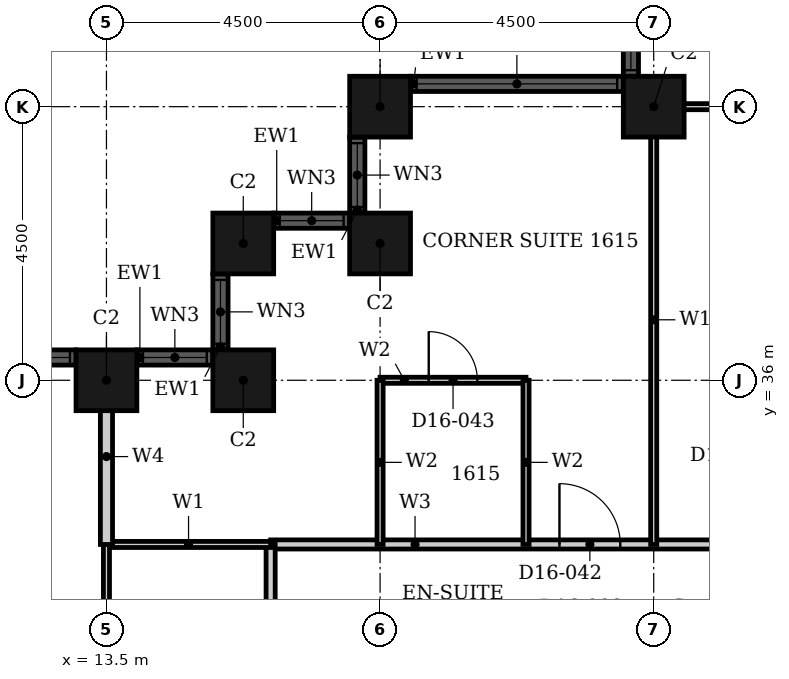
"""IFC4 building model, lengths in metres.
Left out: names, types, materials, properties, quantities, classifications, styles, units other than length and angle.
Written with IfcOpenShell. Run it as: python <this file> out.ifc"""

import sys

from ifc_helpers import new_model, si_unit, direction, frame, frame_2d, origin, origin_2d, place, context, subcontext, project, spatial, rectangle, hollow_rectangle, extrude, element, fill, save


model = new_model("IFC4")
c1 = context("Model", 3, precision=1e-05, world=origin(), true_north=direction((0.0, 1.0)))
c2 = subcontext(c1, "Body", "Model", "MODEL_VIEW")
j1 = project(units=[si_unit("LENGTHUNIT", "METRE"), si_unit("PLANEANGLEUNIT", "RADIAN")], contexts=[c1])
p1 = place(None, origin())
s1 = spatial("IfcSite", under=j1, at=p1, CompositionType="ELEMENT")
p2 = place(p1, origin())
s2 = spatial("IfcBuilding", under=s1, at=p2, CompositionType="ELEMENT")
p3 = place(p2, frame((0.0, 0.0, 70.8)))
s3 = spatial("IfcBuildingStorey", under=s2, at=p3, CompositionType="ELEMENT", Elevation=70.8)
for number, where, z_axis, x_axis in (
    (1, (22.5, 40.5, 0.0), (0.0, 0.0, 1.0), (1.0, 0.0, 0.0)),
    (2, (18.0, 40.5, 0.0), (0.0, 0.0, 1.0), (1.0, 0.0, 0.0)),
    (3, (18.0, 38.25, 0.0), (0.0, 0.0, 1.0), (1.0, 0.0, 0.0)),
    (4, (15.75, 38.25, 0.0), (0.0, 0.0, 1.0), (1.0, 0.0, 0.0)),
    (5, (15.75, 36.0, 0.0), (0.0, 0.0, 1.0), (1.0, 0.0, 0.0)),
    (6, (13.5, 36.0, 0.0), (0.0, 0.0, 1.0), (1.0, 0.0, 0.0)),
):
    element("IfcColumn", number, at=place(p3, frame(where, z_axis=z_axis, x_axis=x_axis)), inside=s3, PredefinedType="COLUMN", context=c2, shape_type="SweptSolid", body=[
        extrude(hollow_rectangle(XDim=1.0, YDim=1.0, WallThickness=0.032, at=origin_2d()), origin(), (0.0, 0.0, 1.0), 3.6),
    ])
p4 = place(p3, frame((22.125, 49.0, 0.0), z_axis=(0.0, 0.0, 1.0), x_axis=(0.0, -1.0, 0.0)))
e7 = element("IfcWall", 7, at=p4, inside=s3, PredefinedType="SOLIDWALL", context=c2, shape_type="SweptSolid", body=[
    extrude(rectangle(XDim=8.0, YDim=0.25, at=frame_2d((4.0, 0.0))), origin(), (0.0, 0.0, 1.0), 3.6),
])
p5 = place(p4, frame((0.1, 0.0, 0.9)))
e8 = element("IfcOpeningElement", 8, at=p5, cuts=e7, PredefinedType="OPENING", context=c2, shape_type="SweptSolid", body=[
    extrude(rectangle(XDim=3.3, YDim=2.08, at=frame_2d((1.65, 1.04))), frame((0.0, 0.135, 0.0), z_axis=(0.0, -1.0, 0.0), x_axis=(1.0, 0.0, 0.0)), (0.0, 0.0, 1.0), 0.27),
])
p6 = place(p4, frame((4.6, 0.0, 0.9)))
e9 = element("IfcOpeningElement", 9, at=p6, cuts=e7, PredefinedType="OPENING", context=c2, shape_type="SweptSolid", body=[
    extrude(rectangle(XDim=3.3, YDim=2.08, at=frame_2d((1.65, 1.04))), frame((0.0, 0.135, 0.0), z_axis=(0.0, -1.0, 0.0), x_axis=(1.0, 0.0, 0.0)), (0.0, 0.0, 1.0), 0.27),
])
p7 = place(p3, frame((22.0, 40.875, 0.0), z_axis=(0.0, 0.0, 1.0), x_axis=(-1.0, 0.0, 0.0)))
e10 = element("IfcWall", 10, at=p7, inside=s3, PredefinedType="SOLIDWALL", context=c2, shape_type="SweptSolid", body=[
    extrude(rectangle(XDim=3.5, YDim=0.25, at=frame_2d((1.75, 0.0))), origin(), (0.0, 0.0, 1.0), 3.6),
])
p8 = place(p7, frame((0.1, 0.0, 0.9)))
e11 = element("IfcOpeningElement", 11, at=p8, cuts=e10, PredefinedType="OPENING", context=c2, shape_type="SweptSolid", body=[
    extrude(rectangle(XDim=3.3, YDim=2.08, at=frame_2d((1.65, 1.04))), frame((0.0, 0.135, 0.0), z_axis=(0.0, -1.0, 0.0), x_axis=(1.0, 0.0, 0.0)), (0.0, 0.0, 1.0), 0.27),
])
p9 = place(p3, frame((17.625, 40.0, 0.0), z_axis=(0.0, 0.0, 1.0), x_axis=(0.0, -1.0, 0.0)))
e12 = element("IfcWall", 12, at=p9, inside=s3, PredefinedType="SOLIDWALL", context=c2, shape_type="SweptSolid", body=[
    extrude(rectangle(XDim=1.25, YDim=0.25, at=frame_2d((0.625, 0.0))), origin(), (0.0, 0.0, 1.0), 3.6),
])
p10 = place(p9, frame((0.1, 0.0, 0.9)))
e13 = element("IfcOpeningElement", 13, at=p10, cuts=e12, PredefinedType="OPENING", context=c2, shape_type="SweptSolid", body=[
    extrude(rectangle(XDim=1.05, YDim=2.08, at=frame_2d((0.525, 1.04))), frame((0.0, 0.135, 0.0), z_axis=(0.0, -1.0, 0.0), x_axis=(1.0, 0.0, 0.0)), (0.0, 0.0, 1.0), 0.27),
])
p11 = place(p3, frame((17.5, 38.625, 0.0), z_axis=(0.0, 0.0, 1.0), x_axis=(-1.0, 0.0, 0.0)))
e14 = element("IfcWall", 14, at=p11, inside=s3, PredefinedType="SOLIDWALL", context=c2, shape_type="SweptSolid", body=[
    extrude(rectangle(XDim=1.25, YDim=0.25, at=frame_2d((0.625, 0.0))), origin(), (0.0, 0.0, 1.0), 3.6),
])
p12 = place(p11, frame((0.1, 0.0, 0.9)))
e15 = element("IfcOpeningElement", 15, at=p12, cuts=e14, PredefinedType="OPENING", context=c2, shape_type="SweptSolid", body=[
    extrude(rectangle(XDim=1.05, YDim=2.08, at=frame_2d((0.525, 1.04))), frame((0.0, 0.135, 0.0), z_axis=(0.0, -1.0, 0.0), x_axis=(1.0, 0.0, 0.0)), (0.0, 0.0, 1.0), 0.27),
])
p13 = place(p3, frame((15.375, 37.75, 0.0), z_axis=(0.0, 0.0, 1.0), x_axis=(0.0, -1.0, 0.0)))
e16 = element("IfcWall", 16, at=p13, inside=s3, PredefinedType="SOLIDWALL", context=c2, shape_type="SweptSolid", body=[
    extrude(rectangle(XDim=1.25, YDim=0.25, at=frame_2d((0.625, 0.0))), origin(), (0.0, 0.0, 1.0), 3.6),
])
p14 = place(p13, frame((0.1, 0.0, 0.9)))
e17 = element("IfcOpeningElement", 17, at=p14, cuts=e16, PredefinedType="OPENING", context=c2, shape_type="SweptSolid", body=[
    extrude(rectangle(XDim=1.05, YDim=2.08, at=frame_2d((0.525, 1.04))), frame((0.0, 0.135, 0.0), z_axis=(0.0, -1.0, 0.0), x_axis=(1.0, 0.0, 0.0)), (0.0, 0.0, 1.0), 0.27),
])
p15 = place(p3, frame((15.25, 36.375, 0.0), z_axis=(0.0, 0.0, 1.0), x_axis=(-1.0, 0.0, 0.0)))
e18 = element("IfcWall", 18, at=p15, inside=s3, PredefinedType="SOLIDWALL", context=c2, shape_type="SweptSolid", body=[
    extrude(rectangle(XDim=1.25, YDim=0.25, at=frame_2d((0.625, 0.0))), origin(), (0.0, 0.0, 1.0), 3.6),
])
p16 = place(p15, frame((0.1, 0.0, 0.9)))
e19 = element("IfcOpeningElement", 19, at=p16, cuts=e18, PredefinedType="OPENING", context=c2, shape_type="SweptSolid", body=[
    extrude(rectangle(XDim=1.05, YDim=2.08, at=frame_2d((0.525, 1.04))), frame((0.0, 0.135, 0.0), z_axis=(0.0, -1.0, 0.0), x_axis=(1.0, 0.0, 0.0)), (0.0, 0.0, 1.0), 0.27),
])
p17 = place(p3, frame((13.0, 36.375, 0.0), z_axis=(0.0, 0.0, 1.0), x_axis=(-1.0, 0.0, 0.0)))
e20 = element("IfcWall", 20, at=p17, inside=s3, PredefinedType="SOLIDWALL", context=c2, shape_type="SweptSolid", body=[
    extrude(rectangle(XDim=8.0, YDim=0.25, at=frame_2d((4.0, 0.0))), origin(), (0.0, 0.0, 1.0), 3.6),
])
p18 = place(p17, frame((0.1, 0.0, 0.9)))
e21 = element("IfcOpeningElement", 21, at=p18, cuts=e20, PredefinedType="OPENING", context=c2, shape_type="SweptSolid", body=[
    extrude(rectangle(XDim=3.3, YDim=2.08, at=frame_2d((1.65, 1.04))), frame((0.0, 0.135, 0.0), z_axis=(0.0, -1.0, 0.0), x_axis=(1.0, 0.0, 0.0)), (0.0, 0.0, 1.0), 0.27),
])
p19 = place(p17, frame((4.6, 0.0, 0.9)))
e22 = element("IfcOpeningElement", 22, at=p19, cuts=e20, PredefinedType="OPENING", context=c2, shape_type="SweptSolid", body=[
    extrude(rectangle(XDim=3.3, YDim=2.08, at=frame_2d((1.65, 1.04))), frame((0.0, 0.135, 0.0), z_axis=(0.0, -1.0, 0.0), x_axis=(1.0, 0.0, 0.0)), (0.0, 0.0, 1.0), 0.27),
])
p20 = place(p3, frame((16.2, 33.3, 0.0), z_axis=(0.0, 0.0, 1.0), x_axis=(1.0, 0.0, 0.0)))
e23 = element("IfcWall", 23, at=p20, inside=s3, PredefinedType="PARTITIONING", context=c2, shape_type="SweptSolid", body=[
    extrude(rectangle(XDim=9.9, YDim=0.15, at=frame_2d((4.95, 0.0))), origin(), (0.0, 0.0, 1.0), 3.3),
])
p21 = place(p20, frame((4.75, 0.0, 0.0)))
e24 = element("IfcOpeningElement", 24, at=p21, cuts=e23, PredefinedType="OPENING", context=c2, shape_type="SweptSolid", body=[
    extrude(rectangle(XDim=1.0, YDim=2.1, at=frame_2d((0.5, 1.05))), frame((0.0, 0.085, 0.0), z_axis=(0.0, -1.0, 0.0), x_axis=(1.0, 0.0, 0.0)), (0.0, 0.0, 1.0), 0.17),
])
p22 = place(p20, frame((7.65, 0.0, 0.0)))
e25 = element("IfcOpeningElement", 25, at=p22, cuts=e23, PredefinedType="OPENING", context=c2, shape_type="SweptSolid", body=[
    extrude(rectangle(XDim=0.9, YDim=2.1, at=frame_2d((0.45, 1.05))), frame((0.0, 0.085, 0.0), z_axis=(0.0, -1.0, 0.0), x_axis=(1.0, 0.0, 0.0)), (0.0, 0.0, 1.0), 0.17),
])
p23 = place(p3, frame((16.2, 27.0, 0.0), z_axis=(0.0, 0.0, 1.0), x_axis=(0.0, 1.0, 0.0)))
e26 = element("IfcWall", 26, at=p23, inside=s3, PredefinedType="PARTITIONING", context=c2, shape_type="SweptSolid", body=[
    extrude(rectangle(XDim=6.3, YDim=0.15, at=frame_2d((3.15, 0.0))), origin(), (0.0, 0.0, 1.0), 3.3),
])
p24 = place(p23, frame((2.55, 0.0, 0.0)))
e27 = element("IfcOpeningElement", 27, at=p24, cuts=e26, PredefinedType="OPENING", context=c2, shape_type="SweptSolid", body=[
    extrude(rectangle(XDim=0.9, YDim=2.1, at=frame_2d((0.45, 1.05))), frame((0.0, 0.085, 0.0), z_axis=(0.0, -1.0, 0.0), x_axis=(1.0, 0.0, 0.0)), (0.0, 0.0, 1.0), 0.17),
])
p25 = place(p3, frame((13.5, 33.3, 0.0), z_axis=(0.0, 0.0, 1.0), x_axis=(1.0, 0.0, 0.0)))
e28 = element("IfcWall", 28, at=p25, inside=s3, PredefinedType="PARTITIONING", context=c2, shape_type="SweptSolid", body=[
    extrude(rectangle(XDim=2.7, YDim=0.1, at=frame_2d((1.35, 0.0))), origin(), (0.0, 0.0, 1.0), 3.3),
])
p26 = place(p3, frame((22.31, 40.5, 0.0), z_axis=(0.0, 0.0, 1.0), x_axis=(1.0, 0.0, 0.0)))
e29 = element("IfcWall", 29, at=p26, inside=s3, PredefinedType="PARTITIONING", context=c2, shape_type="SweptSolid", body=[
    extrude(rectangle(XDim=3.79, YDim=0.1, at=frame_2d((1.895, 0.0))), origin(), (0.0, 0.0, 1.0), 2.38),
])
p27 = place(p3, frame((13.5, 27.0, 0.0), z_axis=(0.0, 0.0, 1.0), x_axis=(0.0, 1.0, 0.0)))
e30 = element("IfcWall", 30, at=p27, inside=s3, PredefinedType="PARTITIONING", context=c2, shape_type="SweptSolid", body=[
    extrude(rectangle(XDim=6.3, YDim=0.1, at=frame_2d((3.15, 0.0))), origin(), (0.0, 0.0, 1.0), 2.38),
])
p28 = place(p3, frame((22.5, 33.3, 0.0), z_axis=(0.0, 0.0, 1.0), x_axis=(0.0, 1.0, 0.0)))
e31 = element("IfcWall", 31, at=p28, inside=s3, PredefinedType="PARTITIONING", context=c2, shape_type="SweptSolid", body=[
    extrude(rectangle(XDim=7.39, YDim=0.1, at=frame_2d((3.695, 0.0))), origin(), (0.0, 0.0, 1.0), 3.3),
])
p29 = place(p3, frame((13.5, 33.3, 0.0), z_axis=(0.0, 0.0, 1.0), x_axis=(0.0, 1.0, 0.0)))
e32 = element("IfcWall", 32, at=p29, inside=s3, PredefinedType="PARTITIONING", context=c2, shape_type="SweptSolid", body=[
    extrude(rectangle(XDim=2.89, YDim=0.2, at=frame_2d((1.445, 0.0))), origin(), (0.0, 0.0, 1.0), 2.38),
])
p30 = place(p3, frame((18.0, 36.0, 0.0), z_axis=(0.0, 0.0, 1.0), x_axis=(1.0, 0.0, 0.0)))
e33 = element("IfcWall", 33, at=p30, inside=s3, PredefinedType="PARTITIONING", context=c2, shape_type="SweptSolid", body=[
    extrude(rectangle(XDim=2.4, YDim=0.1, at=frame_2d((1.2, 0.0))), origin(), (0.0, 0.0, 1.0), 3.3),
])
p31 = place(p30, frame((0.8, 0.0, 0.0)))
e34 = element("IfcOpeningElement", 34, at=p31, cuts=e33, PredefinedType="OPENING", context=c2, shape_type="SweptSolid", body=[
    extrude(rectangle(XDim=0.8, YDim=2.1, at=frame_2d((0.4, 1.05))), frame((0.0, 0.06, 0.0), z_axis=(0.0, -1.0, 0.0), x_axis=(1.0, 0.0, 0.0)), (0.0, 0.0, 1.0), 0.12),
])
for number, where, z_axis, x_axis in (
    (35, (18.0, 33.3, 0.0), (0.0, 0.0, 1.0), (0.0, 1.0, 0.0)),
    (36, (20.4, 33.3, 0.0), (0.0, 0.0, 1.0), (0.0, 1.0, 0.0)),
):
    element("IfcWall", number, at=place(p3, frame(where, z_axis=z_axis, x_axis=x_axis)), inside=s3, PredefinedType="PARTITIONING", context=c2, shape_type="SweptSolid", body=[
        extrude(rectangle(XDim=2.7, YDim=0.1, at=frame_2d((1.35, 0.0))), origin(), (0.0, 0.0, 1.0), 3.3),
    ])
p32 = place(p6, origin())
e37 = element("IfcWindow", 37, at=p32, inside=s3, PartitioningType="SINGLE_PANEL", PredefinedType="WINDOW", context=c2, shape_type="SweptSolid", body=[
    extrude(rectangle(XDim=3.3, YDim=2.08, at=frame_2d((1.65, 1.04))), frame((0.0, 0.03, 0.0), z_axis=(0.0, -1.0, 0.0), x_axis=(1.0, 0.0, 0.0)), (0.0, 0.0, 1.0), 0.06),
])
fill(e9, e37)
p33 = place(p8, origin())
e38 = element("IfcWindow", 38, at=p33, inside=s3, PartitioningType="SINGLE_PANEL", PredefinedType="WINDOW", context=c2, shape_type="SweptSolid", body=[
    extrude(rectangle(XDim=3.3, YDim=2.08, at=frame_2d((1.65, 1.04))), frame((0.0, 0.03, 0.0), z_axis=(0.0, -1.0, 0.0), x_axis=(1.0, 0.0, 0.0)), (0.0, 0.0, 1.0), 0.06),
])
fill(e11, e38)
p34 = place(p10, origin())
e39 = element("IfcWindow", 39, at=p34, inside=s3, PartitioningType="SINGLE_PANEL", PredefinedType="WINDOW", context=c2, shape_type="SweptSolid", body=[
    extrude(rectangle(XDim=1.05, YDim=2.08, at=frame_2d((0.525, 1.04))), frame((0.0, 0.03, 0.0), z_axis=(0.0, -1.0, 0.0), x_axis=(1.0, 0.0, 0.0)), (0.0, 0.0, 1.0), 0.06),
])
fill(e13, e39)
p35 = place(p12, origin())
e40 = element("IfcWindow", 40, at=p35, inside=s3, PartitioningType="SINGLE_PANEL", PredefinedType="WINDOW", context=c2, shape_type="SweptSolid", body=[
    extrude(rectangle(XDim=1.05, YDim=2.08, at=frame_2d((0.525, 1.04))), frame((0.0, 0.03, 0.0), z_axis=(0.0, -1.0, 0.0), x_axis=(1.0, 0.0, 0.0)), (0.0, 0.0, 1.0), 0.06),
])
fill(e15, e40)
p36 = place(p14, origin())
e41 = element("IfcWindow", 41, at=p36, inside=s3, PartitioningType="SINGLE_PANEL", PredefinedType="WINDOW", context=c2, shape_type="SweptSolid", body=[
    extrude(rectangle(XDim=1.05, YDim=2.08, at=frame_2d((0.525, 1.04))), frame((0.0, 0.03, 0.0), z_axis=(0.0, -1.0, 0.0), x_axis=(1.0, 0.0, 0.0)), (0.0, 0.0, 1.0), 0.06),
])
fill(e17, e41)
p37 = place(p16, origin())
e42 = element("IfcWindow", 42, at=p37, inside=s3, PartitioningType="SINGLE_PANEL", PredefinedType="WINDOW", context=c2, shape_type="SweptSolid", body=[
    extrude(rectangle(XDim=1.05, YDim=2.08, at=frame_2d((0.525, 1.04))), frame((0.0, 0.03, 0.0), z_axis=(0.0, -1.0, 0.0), x_axis=(1.0, 0.0, 0.0)), (0.0, 0.0, 1.0), 0.06),
])
fill(e19, e42)
p38 = place(p18, origin())
e43 = element("IfcWindow", 43, at=p38, inside=s3, PartitioningType="SINGLE_PANEL", PredefinedType="WINDOW", context=c2, shape_type="SweptSolid", body=[
    extrude(rectangle(XDim=3.3, YDim=2.08, at=frame_2d((1.65, 1.04))), frame((0.0, 0.03, 0.0), z_axis=(0.0, -1.0, 0.0), x_axis=(1.0, 0.0, 0.0)), (0.0, 0.0, 1.0), 0.06),
])
fill(e21, e43)
p39 = place(p21, origin())
e44 = element("IfcDoor", 44, at=p39, inside=s3, OperationType="SINGLE_SWING_RIGHT", PredefinedType="DOOR", context=c2, shape_type="SweptSolid", body=[
    extrude(rectangle(XDim=1.0, YDim=2.1, at=frame_2d((0.5, 1.05))), frame((0.0, 0.025, 0.0), z_axis=(0.0, -1.0, 0.0), x_axis=(1.0, 0.0, 0.0)), (0.0, 0.0, 1.0), 0.05),
])
fill(e24, e44)
p40 = place(p31, origin())
e45 = element("IfcDoor", 45, at=p40, inside=s3, OperationType="SINGLE_SWING_RIGHT", PredefinedType="DOOR", context=c2, shape_type="SweptSolid", body=[
    extrude(rectangle(XDim=0.8, YDim=2.1, at=frame_2d((0.4, 1.05))), frame((0.0, 0.025, 0.0), z_axis=(0.0, -1.0, 0.0), x_axis=(1.0, 0.0, 0.0)), (0.0, 0.0, 1.0), 0.05),
])
fill(e34, e45)
save(model, sys.argv[1])
